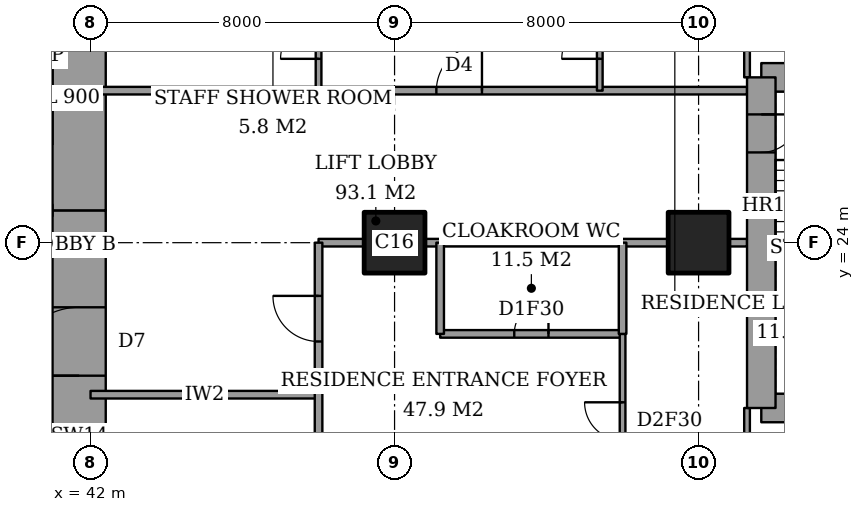
"""IFC4 building model, lengths in metres.
Left out: names, types, materials, properties, quantities, classifications, styles, units other than length and angle.
Written with IfcOpenShell. Run it as: python <this file> out.ifc"""

import sys

from ifc_helpers import new_model, si_unit, direction, frame, frame_2d, origin, origin_2d, place, context, subcontext, project, spatial, rectangle, extrude, element, fill, save


model = new_model("IFC4")
c1 = context("Model", 3, precision=1e-05, world=origin(), true_north=direction((0.0, 1.0)))
c2 = subcontext(c1, "Body", "Model", "MODEL_VIEW")
j1 = project(units=[si_unit("LENGTHUNIT", "METRE"), si_unit("PLANEANGLEUNIT", "RADIAN")], contexts=[c1])
p1 = place(None, origin())
s1 = spatial("IfcSite", under=j1, at=p1, CompositionType="ELEMENT")
p2 = place(p1, origin())
s2 = spatial("IfcBuilding", under=s1, at=p2, CompositionType="ELEMENT")
p3 = place(p2, frame((0.0, 0.0, 273.6)))
s3 = spatial("IfcBuildingStorey", under=s2, at=p3, CompositionType="ELEMENT", Elevation=273.6)
for number, where, z_axis, x_axis in (
    (1, (50.0, 24.0, 0.0), (0.0, 0.0, 1.0), (1.0, 0.0, 0.0)),
    (2, (58.0, 24.0, 0.0), (0.0, 0.0, 1.0), (1.0, 0.0, 0.0)),
):
    element("IfcColumn", number, at=place(p3, frame(where, z_axis=z_axis, x_axis=x_axis)), inside=s3, PredefinedType="COLUMN", context=c2, shape_type="SweptSolid", body=[
        extrude(rectangle(XDim=1.6, YDim=1.6, at=origin_2d()), origin(), (0.0, 0.0, 1.0), 3.6),
    ])
p4 = place(p3, frame((41.7, 13.0, 0.0), z_axis=(0.0, 0.0, 1.0), x_axis=(0.0, 1.0, 0.0)))
e3 = element("IfcWall", 3, at=p4, inside=s3, PredefinedType="SHEAR", context=c2, shape_type="SweptSolid", body=[
    extrude(rectangle(XDim=11.85, YDim=1.4, at=frame_2d((5.925, 0.0))), origin(), (0.0, 0.0, 1.0), 3.6),
])
p5 = place(p4, frame((7.5, 0.0, 0.0)))
e4 = element("IfcOpeningElement", 4, at=p5, cuts=e3, PredefinedType="OPENING", context=c2, shape_type="SweptSolid", body=[
    extrude(rectangle(XDim=1.8, YDim=2.4, at=frame_2d((0.9, 1.2))), frame((0.0, 0.71, 0.0), z_axis=(0.0, -1.0, 0.0), x_axis=(1.0, 0.0, 0.0)), (0.0, 0.0, 1.0), 1.42),
])
p6 = place(p3, frame((41.7, 24.85, 0.0), z_axis=(0.0, 0.0, 1.0), x_axis=(0.0, 1.0, 0.0)))
e5 = element("IfcWall", 5, at=p6, inside=s3, PredefinedType="SHEAR", context=c2, shape_type="SweptSolid", body=[
    extrude(rectangle(XDim=10.15, YDim=1.4, at=frame_2d((5.075, 0.0))), origin(), (0.0, 0.0, 1.0), 3.6),
])
for number, where, z_axis, x_axis in (
    (6, (59.65, 19.65, 0.0), (0.0, 0.0, 1.0), (1.0, 0.0, 0.0)),
    (7, (64.1, 28.35, 0.0), (0.0, 0.0, 1.0), (-1.0, 0.0, 0.0)),
):
    element("IfcWall", number, at=place(p3, frame(where, z_axis=z_axis, x_axis=x_axis)), inside=s3, PredefinedType="SHEAR", context=c2, shape_type="SweptSolid", body=[
        extrude(rectangle(XDim=4.45, YDim=0.75, at=frame_2d((2.225, 0.0))), origin(), (0.0, 0.0, 1.0), 3.6),
    ])
p7 = place(p3, frame((59.65, 28.35, 0.0), z_axis=(0.0, 0.0, 1.0), x_axis=(0.0, -1.0, 0.0)))
e8 = element("IfcWall", 8, at=p7, inside=s3, PredefinedType="SHEAR", context=c2, shape_type="SweptSolid", body=[
    extrude(rectangle(XDim=8.7, YDim=0.75, at=frame_2d((4.35, 0.0))), origin(), (0.0, 0.0, 1.0), 3.6),
])
p8 = place(p7, frame((0.975, 0.0, 0.0)))
e9 = element("IfcOpeningElement", 9, at=p8, cuts=e8, PredefinedType="OPENING", context=c2, shape_type="SweptSolid", body=[
    extrude(rectangle(XDim=1.0, YDim=2.1, at=frame_2d((0.5, 1.05))), frame((0.0, 0.385, 0.0), z_axis=(0.0, -1.0, 0.0), x_axis=(1.0, 0.0, 0.0)), (0.0, 0.0, 1.0), 0.77),
])
p9 = place(p3, frame((42.0, 20.0, 0.0), z_axis=(0.0, 0.0, 1.0), x_axis=(1.0, 0.0, 0.0)))
e10 = element("IfcWall", 10, at=p9, inside=s3, PredefinedType="PARTITIONING", context=c2, shape_type="SweptSolid", body=[
    extrude(rectangle(XDim=6.0, YDim=0.2, at=frame_2d((3.0, 0.0))), origin(), (0.0, 0.0, 1.0), 3.25),
])
p10 = place(p3, frame((51.2, 21.6, 0.0), z_axis=(0.0, 0.0, 1.0), x_axis=(1.0, 0.0, 0.0)))
e11 = element("IfcWall", 11, at=p10, inside=s3, PredefinedType="PARTITIONING", context=c2, shape_type="SweptSolid", body=[
    extrude(rectangle(XDim=4.8, YDim=0.2, at=frame_2d((2.4, 0.0))), origin(), (0.0, 0.0, 1.0), 3.25),
])
p11 = place(p10, frame((1.95, 0.0, 0.0)))
e12 = element("IfcOpeningElement", 12, at=p11, cuts=e11, PredefinedType="OPENING", context=c2, shape_type="SweptSolid", body=[
    extrude(rectangle(XDim=0.9, YDim=2.1, at=frame_2d((0.45, 1.05))), frame((0.0, 0.11, 0.0), z_axis=(0.0, -1.0, 0.0), x_axis=(1.0, 0.0, 0.0)), (0.0, 0.0, 1.0), 0.22),
])
p12 = place(p3, frame((48.0, 24.0, 0.0), z_axis=(0.0, 0.0, 1.0), x_axis=(1.0, 0.0, 0.0)))
e13 = element("IfcWall", 13, at=p12, inside=s3, PredefinedType="PARTITIONING", context=c2, shape_type="SweptSolid", body=[
    extrude(rectangle(XDim=1.2, YDim=0.2, at=frame_2d((0.6, 0.0))), origin(), (0.0, 0.0, 1.0), 3.25),
])
p13 = place(p3, frame((50.8, 24.0, 0.0), z_axis=(0.0, 0.0, 1.0), x_axis=(1.0, 0.0, 0.0)))
e14 = element("IfcWall", 14, at=p13, inside=s3, PredefinedType="PARTITIONING", context=c2, shape_type="SweptSolid", body=[
    extrude(rectangle(XDim=6.4, YDim=0.2, at=frame_2d((3.2, 0.0))), origin(), (0.0, 0.0, 1.0), 3.25),
])
p14 = place(p3, frame((58.8, 24.0, 0.0), z_axis=(0.0, 0.0, 1.0), x_axis=(1.0, 0.0, 0.0)))
e15 = element("IfcWall", 15, at=p14, inside=s3, PredefinedType="PARTITIONING", context=c2, shape_type="SweptSolid", body=[
    extrude(rectangle(XDim=0.475, YDim=0.2, at=frame_2d((0.237, 0.0))), origin(), (0.0, 0.0, 1.0), 3.25),
])
p15 = place(p3, frame((42.0, 28.0, 0.0), z_axis=(0.0, 0.0, 1.0), x_axis=(1.0, 0.0, 0.0)))
e16 = element("IfcWall", 16, at=p15, inside=s3, PredefinedType="PARTITIONING", context=c2, shape_type="SweptSolid", body=[
    extrude(rectangle(XDim=17.275, YDim=0.2, at=frame_2d((8.637, 0.0))), origin(), (0.0, 0.0, 1.0), 3.25),
])
p16 = place(p15, frame((9.1, 0.0, 0.0)))
e17 = element("IfcOpeningElement", 17, at=p16, cuts=e16, PredefinedType="OPENING", context=c2, shape_type="SweptSolid", body=[
    extrude(rectangle(XDim=1.2, YDim=2.4, at=frame_2d((0.6, 1.2))), frame((0.0, 0.11, 0.0), z_axis=(0.0, -1.0, 0.0), x_axis=(1.0, 0.0, 0.0)), (0.0, 0.0, 1.0), 0.22),
])
p17 = place(p3, frame((48.0, 17.0, 0.0), z_axis=(0.0, 0.0, 1.0), x_axis=(0.0, 1.0, 0.0)))
e18 = element("IfcWall", 18, at=p17, inside=s3, PredefinedType="PARTITIONING", context=c2, shape_type="SweptSolid", body=[
    extrude(rectangle(XDim=7.0, YDim=0.2, at=frame_2d((3.5, 0.0))), origin(), (0.0, 0.0, 1.0), 3.25),
])
p18 = place(p17, frame((4.4, 0.0, 0.0)))
e19 = element("IfcOpeningElement", 19, at=p18, cuts=e18, PredefinedType="OPENING", context=c2, shape_type="SweptSolid", body=[
    extrude(rectangle(XDim=1.2, YDim=2.4, at=frame_2d((0.6, 1.2))), frame((0.0, 0.11, 0.0), z_axis=(0.0, -1.0, 0.0), x_axis=(1.0, 0.0, 0.0)), (0.0, 0.0, 1.0), 0.22),
])
p19 = place(p17, frame((1.05, 0.0, 0.0)))
e20 = element("IfcOpeningElement", 20, at=p19, cuts=e18, PredefinedType="OPENING", context=c2, shape_type="SweptSolid", body=[
    extrude(rectangle(XDim=0.9, YDim=2.1, at=frame_2d((0.45, 1.05))), frame((0.0, 0.11, 0.0), z_axis=(0.0, -1.0, 0.0), x_axis=(1.0, 0.0, 0.0)), (0.0, 0.0, 1.0), 0.22),
])
p20 = place(p3, frame((48.0, 28.0, 0.0), z_axis=(0.0, 0.0, 1.0), x_axis=(0.0, 1.0, 0.0)))
e21 = element("IfcWall", 21, at=p20, inside=s3, PredefinedType="PARTITIONING", context=c2, shape_type="SweptSolid", body=[
    extrude(rectangle(XDim=9.4, YDim=0.15, at=frame_2d((4.7, 0.0))), origin(), (0.0, 0.0, 1.0), 3.25),
])
p21 = place(p20, frame((0.837, 0.0, 0.0)))
e22 = element("IfcOpeningElement", 22, at=p21, cuts=e21, PredefinedType="OPENING", context=c2, shape_type="SweptSolid", body=[
    extrude(rectangle(XDim=1.0, YDim=2.1, at=frame_2d((0.5, 1.05))), frame((0.0, 0.085, 0.0), z_axis=(0.0, -1.0, 0.0), x_axis=(1.0, 0.0, 0.0)), (0.0, 0.0, 1.0), 0.17),
])
p22 = place(p3, frame((51.2, 21.6, 0.0), z_axis=(0.0, 0.0, 1.0), x_axis=(0.0, 1.0, 0.0)))
e23 = element("IfcWall", 23, at=p22, inside=s3, PredefinedType="PARTITIONING", context=c2, shape_type="SweptSolid", body=[
    extrude(rectangle(XDim=2.4, YDim=0.2, at=frame_2d((1.2, 0.0))), origin(), (0.0, 0.0, 1.0), 3.25),
])
p23 = place(p3, frame((55.4, 28.0, 0.0), z_axis=(0.0, 0.0, 1.0), x_axis=(0.0, 1.0, 0.0)))
e24 = element("IfcWall", 24, at=p23, inside=s3, PredefinedType="PARTITIONING", context=c2, shape_type="SweptSolid", body=[
    extrude(rectangle(XDim=9.4, YDim=0.15, at=frame_2d((4.7, 0.0))), origin(), (0.0, 0.0, 1.0), 3.25),
])
p24 = place(p23, frame((0.837, 0.0, 0.0)))
e25 = element("IfcOpeningElement", 25, at=p24, cuts=e24, PredefinedType="OPENING", context=c2, shape_type="SweptSolid", body=[
    extrude(rectangle(XDim=1.0, YDim=2.1, at=frame_2d((0.5, 1.05))), frame((0.0, 0.085, 0.0), z_axis=(0.0, -1.0, 0.0), x_axis=(1.0, 0.0, 0.0)), (0.0, 0.0, 1.0), 0.17),
])
p25 = place(p3, frame((56.0, 21.6, 0.0), z_axis=(0.0, 0.0, 1.0), x_axis=(0.0, 1.0, 0.0)))
e26 = element("IfcWall", 26, at=p25, inside=s3, PredefinedType="PARTITIONING", context=c2, shape_type="SweptSolid", body=[
    extrude(rectangle(XDim=2.4, YDim=0.2, at=frame_2d((1.2, 0.0))), origin(), (0.0, 0.0, 1.0), 3.25),
])
p26 = place(p3, frame((56.0, 10.6, 0.0), z_axis=(0.0, 0.0, 1.0), x_axis=(0.0, 1.0, 0.0)))
e27 = element("IfcWall", 27, at=p26, inside=s3, PredefinedType="PARTITIONING", context=c2, shape_type="SweptSolid", body=[
    extrude(rectangle(XDim=11.0, YDim=0.15, at=frame_2d((5.5, 0.0))), origin(), (0.0, 0.0, 1.0), 3.25),
])
p27 = place(p26, frame((8.2, 0.0, 0.0)))
e28 = element("IfcOpeningElement", 28, at=p27, cuts=e27, PredefinedType="OPENING", context=c2, shape_type="SweptSolid", body=[
    extrude(rectangle(XDim=1.0, YDim=2.1, at=frame_2d((0.5, 1.05))), frame((0.0, 0.085, 0.0), z_axis=(0.0, -1.0, 0.0), x_axis=(1.0, 0.0, 0.0)), (0.0, 0.0, 1.0), 0.17),
])
p28 = place(p3, frame((59.275, 17.2, 0.0), z_axis=(0.0, 0.0, 1.0), x_axis=(0.0, 1.0, 0.0)))
e29 = element("IfcWall", 29, at=p28, inside=s3, PredefinedType="PARTITIONING", context=c2, shape_type="SweptSolid", body=[
    extrude(rectangle(XDim=2.45, YDim=0.15, at=frame_2d((1.225, 0.0))), origin(), (0.0, 0.0, 1.0), 3.25),
])
p29 = place(p28, frame((0.538, 0.0, 0.0)))
e30 = element("IfcOpeningElement", 30, at=p29, cuts=e29, PredefinedType="OPENING", context=c2, shape_type="SweptSolid", body=[
    extrude(rectangle(XDim=1.0, YDim=2.1, at=frame_2d((0.5, 1.05))), frame((0.0, 0.085, 0.0), z_axis=(0.0, -1.0, 0.0), x_axis=(1.0, 0.0, 0.0)), (0.0, 0.0, 1.0), 0.17),
])
p30 = place(p3, frame((59.275, 28.35, 0.0), z_axis=(0.0, 0.0, 1.0), x_axis=(0.0, 1.0, 0.0)))
e31 = element("IfcWall", 31, at=p30, inside=s3, PredefinedType="PARTITIONING", context=c2, shape_type="SweptSolid", body=[
    extrude(rectangle(XDim=2.45, YDim=0.15, at=frame_2d((1.225, 0.0))), origin(), (0.0, 0.0, 1.0), 3.25),
])
p31 = place(p30, frame((0.913, 0.0, 0.0)))
e32 = element("IfcOpeningElement", 32, at=p31, cuts=e31, PredefinedType="OPENING", context=c2, shape_type="SweptSolid", body=[
    extrude(rectangle(XDim=1.0, YDim=2.1, at=frame_2d((0.5, 1.05))), frame((0.0, 0.085, 0.0), z_axis=(0.0, -1.0, 0.0), x_axis=(1.0, 0.0, 0.0)), (0.0, 0.0, 1.0), 0.17),
])
p32 = place(p27, origin())
e33 = element("IfcDoor", 33, at=p32, inside=s3, OperationType="SINGLE_SWING_LEFT", PredefinedType="DOOR", context=c2, shape_type="SweptSolid", body=[
    extrude(rectangle(XDim=1.0, YDim=2.1, at=frame_2d((0.5, 1.05))), frame((0.0, 0.025, 0.0), z_axis=(0.0, -1.0, 0.0), x_axis=(1.0, 0.0, 0.0)), (0.0, 0.0, 1.0), 0.05),
])
fill(e28, e33)
p33 = place(p11, origin())
e34 = element("IfcDoor", 34, at=p33, inside=s3, OperationType="SINGLE_SWING_LEFT", PredefinedType="DOOR", context=c2, shape_type="SweptSolid", body=[
    extrude(rectangle(XDim=0.9, YDim=2.1, at=frame_2d((0.45, 1.05))), frame((0.0, 0.025, 0.0), z_axis=(0.0, -1.0, 0.0), x_axis=(1.0, 0.0, 0.0)), (0.0, 0.0, 1.0), 0.05),
])
fill(e12, e34)
p34 = place(p18, origin())
e35 = element("IfcDoor", 35, at=p34, inside=s3, OperationType="SINGLE_SWING_LEFT", PredefinedType="DOOR", context=c2, shape_type="SweptSolid", body=[
    extrude(rectangle(XDim=1.2, YDim=2.4, at=frame_2d((0.6, 1.2))), frame((0.0, 0.025, 0.0), z_axis=(0.0, -1.0, 0.0), x_axis=(1.0, 0.0, 0.0)), (0.0, 0.0, 1.0), 0.05),
])
fill(e19, e35)
p35 = place(p24, origin())
e36 = element("IfcDoor", 36, at=p35, inside=s3, OperationType="SINGLE_SWING_RIGHT", PredefinedType="DOOR", context=c2, shape_type="SweptSolid", body=[
    extrude(rectangle(XDim=1.0, YDim=2.1, at=frame_2d((0.5, 1.05))), frame((0.0, 0.025, 0.0), z_axis=(0.0, -1.0, 0.0), x_axis=(1.0, 0.0, 0.0)), (0.0, 0.0, 1.0), 0.05),
])
fill(e25, e36)
p36 = place(p16, origin())
e37 = element("IfcDoor", 37, at=p36, inside=s3, OperationType="SINGLE_SWING_LEFT", PredefinedType="DOOR", context=c2, shape_type="SweptSolid", body=[
    extrude(rectangle(XDim=1.2, YDim=2.4, at=frame_2d((0.6, 1.2))), frame((0.0, 0.025, 0.0), z_axis=(0.0, -1.0, 0.0), x_axis=(1.0, 0.0, 0.0)), (0.0, 0.0, 1.0), 0.05),
])
fill(e17, e37)
p37 = place(p21, origin())
e38 = element("IfcDoor", 38, at=p37, inside=s3, OperationType="SINGLE_SWING_RIGHT", PredefinedType="DOOR", context=c2, shape_type="SweptSolid", body=[
    extrude(rectangle(XDim=1.0, YDim=2.1, at=frame_2d((0.5, 1.05))), frame((0.0, 0.025, 0.0), z_axis=(0.0, -1.0, 0.0), x_axis=(1.0, 0.0, 0.0)), (0.0, 0.0, 1.0), 0.05),
])
fill(e22, e38)
p38 = place(p5, origin())
e39 = element("IfcDoor", 39, at=p38, inside=s3, OperationType="DOUBLE_DOOR_DOUBLE_SWING", PredefinedType="DOOR", context=c2, shape_type="SweptSolid", body=[
    extrude(rectangle(XDim=1.8, YDim=2.4, at=frame_2d((0.9, 1.2))), frame((0.0, 0.025, 0.0), z_axis=(0.0, -1.0, 0.0), x_axis=(1.0, 0.0, 0.0)), (0.0, 0.0, 1.0), 0.05),
])
fill(e4, e39)
p39 = place(p8, origin())
e40 = element("IfcDoor", 40, at=p39, inside=s3, OperationType="SINGLE_SWING_RIGHT", PredefinedType="DOOR", context=c2, shape_type="SweptSolid", body=[
    extrude(rectangle(XDim=1.0, YDim=2.1, at=frame_2d((0.5, 1.05))), frame((0.0, 0.025, 0.0), z_axis=(0.0, -1.0, 0.0), x_axis=(1.0, 0.0, 0.0)), (0.0, 0.0, 1.0), 0.05),
])
fill(e9, e40)
save(model, sys.argv[1])
